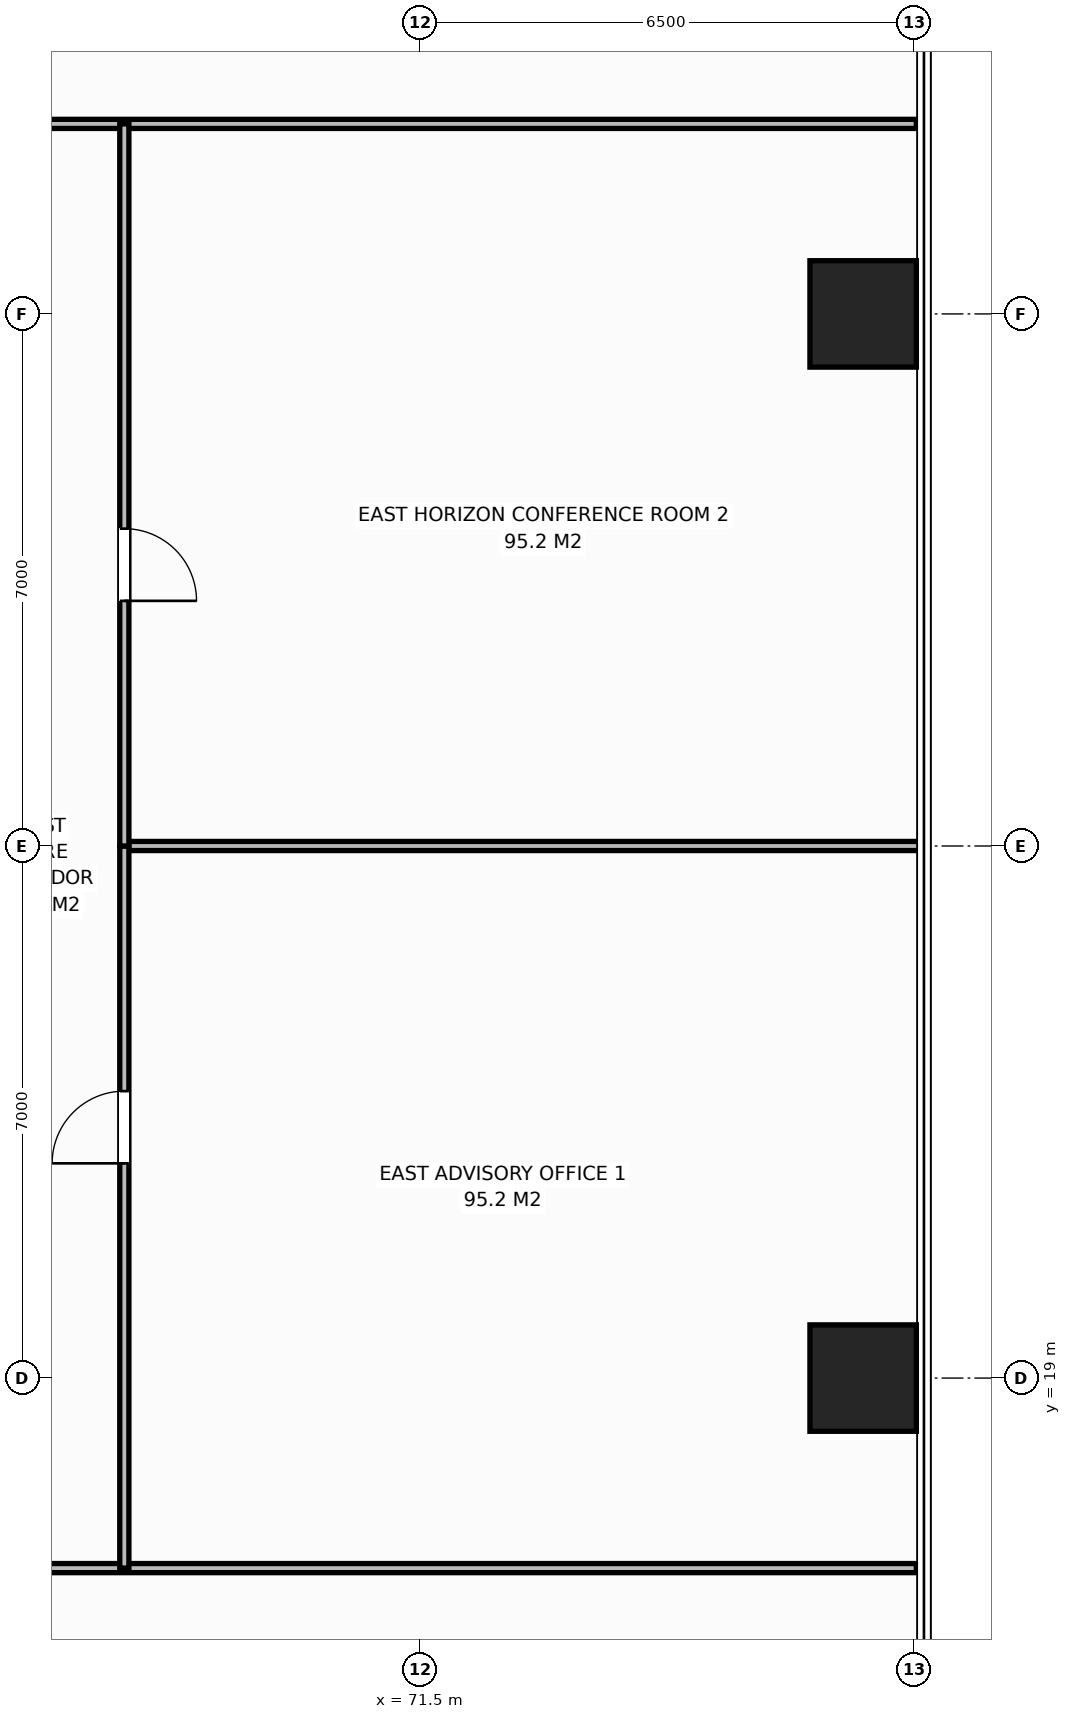
"""IFC4 building model, lengths in metres.
Left out: names, types, materials, properties, quantities, classifications, styles, units other than length and angle.
Written with IfcOpenShell. Run it as: python <this file> out.ifc"""

import sys

from ifc_helpers import new_model, si_unit, direction, frame, frame_2d, origin, origin_2d, place, context, subcontext, project, spatial, rectangle, extrude, element, fill, save


model = new_model("IFC4")
c1 = context("Model", 3, precision=1e-05, world=origin(), true_north=direction((0.0, 1.0)))
c2 = subcontext(c1, "Body", "Model", "MODEL_VIEW")
j1 = project(units=[si_unit("LENGTHUNIT", "METRE"), si_unit("PLANEANGLEUNIT", "RADIAN")], contexts=[c1])
p1 = place(None, origin())
s1 = spatial("IfcSite", under=j1, at=p1, CompositionType="ELEMENT")
p2 = place(p1, origin())
s2 = spatial("IfcBuilding", under=s1, at=p2, CompositionType="ELEMENT")
p3 = place(p2, frame((0.0, 0.0, 31.6)))
s3 = spatial("IfcBuildingStorey", under=s2, at=p3, CompositionType="ELEMENT", Elevation=31.6)
for number, where, z_axis, x_axis in (
    (1, (77.32, 19.0, 0.0), (0.0, 0.0, 1.0), (1.0, 0.0, 0.0)),
    (2, (77.32, 33.0, 0.0), (0.0, 0.0, 1.0), (1.0, 0.0, 0.0)),
):
    element("IfcColumn", number, at=place(p3, frame(where, z_axis=z_axis, x_axis=x_axis)), inside=s3, PredefinedType="COLUMN", context=c2, shape_type="SweptSolid", body=[
        extrude(rectangle(XDim=1.4, YDim=1.4, at=origin_2d()), origin(), (0.0, 0.0, 1.0), 3.8),
    ])
p4 = place(p3, frame((32.46, 35.5, 0.0), z_axis=(0.0, 0.0, 1.0), x_axis=(1.0, 0.0, 0.0)))
e3 = element("IfcWall", 3, at=p4, inside=s3, PredefinedType="PARTITIONING", context=c2, shape_type="SweptSolid", body=[
    extrude(rectangle(XDim=45.56, YDim=0.12, at=frame_2d((22.78, 0.0))), origin(), (0.0, 0.0, 1.0), 3.55),
])
p5 = place(p4, frame((17.095, 0.0, 0.0)))
e4 = element("IfcOpeningElement", 4, at=p5, cuts=e3, PredefinedType="OPENING", context=c2, shape_type="SweptSolid", body=[
    extrude(rectangle(XDim=0.95, YDim=2.15, at=frame_2d((0.475, 1.075))), frame((0.0, 0.07, 0.0), z_axis=(0.0, -1.0, 0.0), x_axis=(1.0, 0.0, 0.0)), (0.0, 0.0, 1.0), 0.14),
])
p6 = place(p3, frame((40.043, 16.5, 0.0), z_axis=(0.0, 0.0, 1.0), x_axis=(1.0, 0.0, 0.0)))
e5 = element("IfcWall", 5, at=p6, inside=s3, PredefinedType="PARTITIONING", context=c2, shape_type="SweptSolid", body=[
    extrude(rectangle(XDim=37.977, YDim=0.12, at=frame_2d((18.988, 0.0))), origin(), (0.0, 0.0, 1.0), 3.55),
])
p7 = place(p6, frame((13.303, 0.0, 0.0)))
e6 = element("IfcOpeningElement", 6, at=p7, cuts=e5, PredefinedType="OPENING", context=c2, shape_type="SweptSolid", body=[
    extrude(rectangle(XDim=0.95, YDim=2.15, at=frame_2d((0.475, 1.075))), frame((0.0, 0.07, 0.0), z_axis=(0.0, -1.0, 0.0), x_axis=(1.0, 0.0, 0.0)), (0.0, 0.0, 1.0), 0.14),
])
p8 = place(p3, frame((67.6, 26.0, 0.0), z_axis=(0.0, 0.0, 1.0), x_axis=(1.0, 0.0, 0.0)))
e7 = element("IfcWall", 7, at=p8, inside=s3, PredefinedType="PARTITIONING", context=c2, shape_type="SweptSolid", body=[
    extrude(rectangle(XDim=10.58, YDim=0.12, at=frame_2d((5.29, 0.0))), origin(), (0.0, 0.0, 1.0), 3.55),
])
p9 = place(p3, frame((67.6, 16.5, 0.0), z_axis=(0.0, 0.0, 1.0), x_axis=(0.0, 1.0, 0.0)))
e8 = element("IfcWall", 8, at=p9, inside=s3, PredefinedType="PARTITIONING", context=c2, shape_type="SweptSolid", body=[
    extrude(rectangle(XDim=9.5, YDim=0.12, at=frame_2d((4.75, 0.0))), origin(), (0.0, 0.0, 1.0), 3.55),
])
p10 = place(p9, frame((5.325, 0.0, 0.0)))
e9 = element("IfcOpeningElement", 9, at=p10, cuts=e8, PredefinedType="OPENING", context=c2, shape_type="SweptSolid", body=[
    extrude(rectangle(XDim=0.95, YDim=2.15, at=frame_2d((0.475, 1.075))), frame((0.0, 0.07, 0.0), z_axis=(0.0, -1.0, 0.0), x_axis=(1.0, 0.0, 0.0)), (0.0, 0.0, 1.0), 0.14),
])
p11 = place(p3, frame((67.6, 26.0, 0.0), z_axis=(0.0, 0.0, 1.0), x_axis=(0.0, 1.0, 0.0)))
e10 = element("IfcWall", 10, at=p11, inside=s3, PredefinedType="PARTITIONING", context=c2, shape_type="SweptSolid", body=[
    extrude(rectangle(XDim=9.5, YDim=0.12, at=frame_2d((4.75, 0.0))), origin(), (0.0, 0.0, 1.0), 3.55),
])
p12 = place(p11, frame((3.225, 0.0, 0.0)))
e11 = element("IfcOpeningElement", 11, at=p12, cuts=e10, PredefinedType="OPENING", context=c2, shape_type="SweptSolid", body=[
    extrude(rectangle(XDim=0.95, YDim=2.15, at=frame_2d((0.475, 1.075))), frame((0.0, 0.07, 0.0), z_axis=(0.0, -1.0, 0.0), x_axis=(1.0, 0.0, 0.0)), (0.0, 0.0, 1.0), 0.14),
])
p13 = place(p10, origin())
e12 = element("IfcDoor", 12, at=p13, inside=s3, OperationType="SINGLE_SWING_LEFT", PredefinedType="DOOR", context=c2, shape_type="SweptSolid", body=[
    extrude(rectangle(XDim=0.95, YDim=2.15, at=frame_2d((0.475, 1.075))), frame((0.0, 0.025, 0.0), z_axis=(0.0, -1.0, 0.0), x_axis=(1.0, 0.0, 0.0)), (0.0, 0.0, 1.0), 0.05),
])
fill(e9, e12)
p14 = place(p12, origin())
e13 = element("IfcDoor", 13, at=p14, inside=s3, OperationType="SINGLE_SWING_RIGHT", PredefinedType="DOOR", context=c2, shape_type="SweptSolid", body=[
    extrude(rectangle(XDim=0.95, YDim=2.15, at=frame_2d((0.475, 1.075))), frame((0.0, 0.025, 0.0), z_axis=(0.0, -1.0, 0.0), x_axis=(1.0, 0.0, 0.0)), (0.0, 0.0, 1.0), 0.05),
])
fill(e11, e13)
save(model, sys.argv[1])
